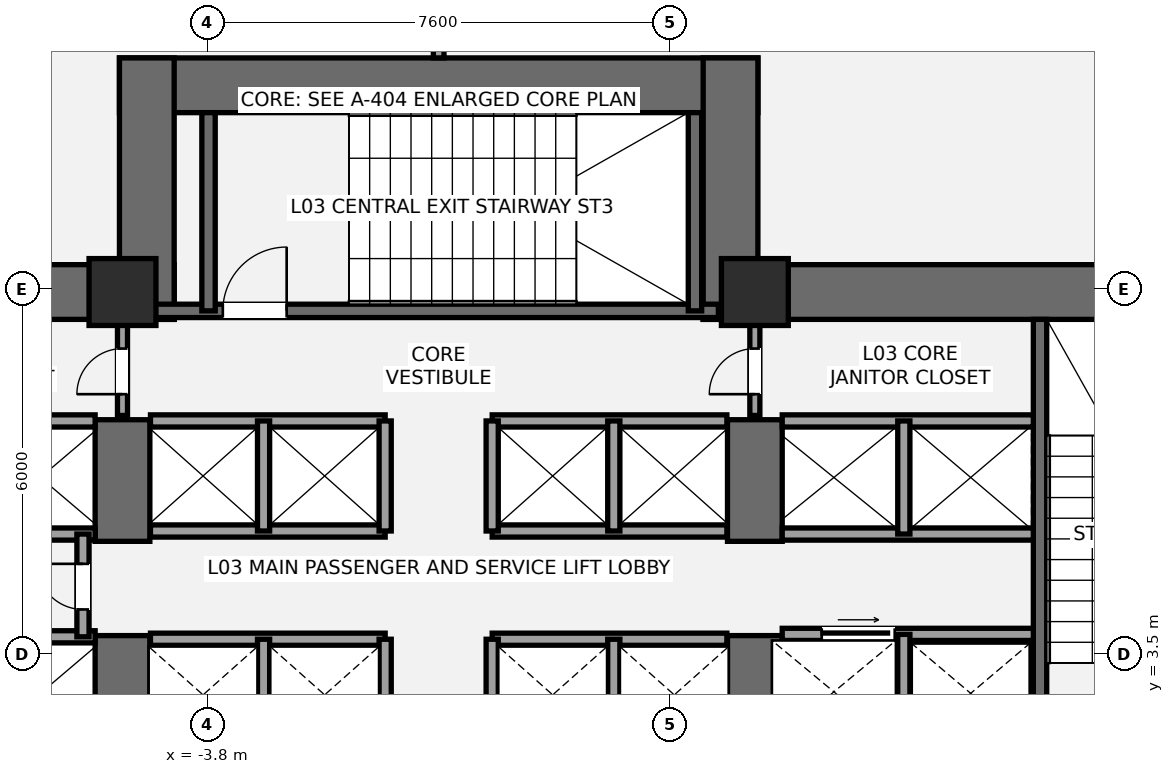
"""IFC4 building model, lengths in metres.
Left out: names, types, materials, properties, quantities, classifications, styles, units other than length and angle.
Written with IfcOpenShell. Run it as: python <this file> out.ifc"""

import sys

from ifc_helpers import new_model, si_unit, direction, frame, frame_2d, origin, origin_2d, place, context, subcontext, project, spatial, rectangle, extrude, element, fill, save


model = new_model("IFC4")
c1 = context("Model", 3, precision=1e-05, world=origin(), true_north=direction((0.0, 1.0)))
c2 = subcontext(c1, "Body", "Model", "MODEL_VIEW")
j1 = project(units=[si_unit("LENGTHUNIT", "METRE"), si_unit("PLANEANGLEUNIT", "RADIAN")], contexts=[c1])
p1 = place(None, origin())
s1 = spatial("IfcSite", under=j1, at=p1, CompositionType="ELEMENT")
p2 = place(p1, origin())
s2 = spatial("IfcBuilding", under=s1, at=p2, CompositionType="ELEMENT")
p3 = place(p2, frame((0.0, 0.0, 14.4)))
s3 = spatial("IfcBuildingStorey", under=s2, at=p3, CompositionType="ELEMENT", Elevation=14.4)
p4 = place(p3, frame((-14.05, 9.45, 0.0), z_axis=(0.0, 0.0, 1.0), x_axis=(1.0, 0.0, 0.0)))
e1 = element("IfcWall", 1, at=p4, inside=s3, PredefinedType="SHEAR", context=c2, shape_type="SweptSolid", body=[
    extrude(rectangle(XDim=9.7, YDim=0.9, at=frame_2d((4.85, 0.0))), origin(), (0.0, 0.0, 1.0), 4.2),
])
p5 = place(p3, frame((-5.2, 0.95, 0.0), z_axis=(0.0, 0.0, 1.0), x_axis=(0.0, 1.0, 0.0)))
e2 = element("IfcWall", 2, at=p5, inside=s3, PredefinedType="SHEAR", context=c2, shape_type="SweptSolid", body=[
    extrude(rectangle(XDim=2.85, YDim=0.9, at=frame_2d((1.425, 0.0))), origin(), (0.0, 0.0, 1.0), 4.2),
])
p6 = place(p3, frame((-5.2, 5.35, 0.0), z_axis=(0.0, 0.0, 1.0), x_axis=(0.0, 1.0, 0.0)))
e3 = element("IfcWall", 3, at=p6, inside=s3, PredefinedType="SHEAR", context=c2, shape_type="SweptSolid", body=[
    extrude(rectangle(XDim=2.0, YDim=0.9, at=frame_2d((1.0, 0.0))), origin(), (0.0, 0.0, 1.0), 4.2),
])
p7 = place(p3, frame((4.35, 9.45, 0.0), z_axis=(0.0, 0.0, 1.0), x_axis=(1.0, 0.0, 0.0)))
e4 = element("IfcWall", 4, at=p7, inside=s3, PredefinedType="SHEAR", context=c2, shape_type="SweptSolid", body=[
    extrude(rectangle(XDim=9.7, YDim=0.9, at=frame_2d((4.85, 0.0))), origin(), (0.0, 0.0, 1.0), 4.2),
])
p8 = place(p3, frame((5.2, 0.95, 0.0), z_axis=(0.0, 0.0, 1.0), x_axis=(0.0, 1.0, 0.0)))
e5 = element("IfcWall", 5, at=p8, inside=s3, PredefinedType="SHEAR", context=c2, shape_type="SweptSolid", body=[
    extrude(rectangle(XDim=2.85, YDim=0.9, at=frame_2d((1.425, 0.0))), origin(), (0.0, 0.0, 1.0), 4.2),
])
p9 = place(p3, frame((5.2, 5.35, 0.0), z_axis=(0.0, 0.0, 1.0), x_axis=(0.0, 1.0, 0.0)))
e6 = element("IfcWall", 6, at=p9, inside=s3, PredefinedType="SHEAR", context=c2, shape_type="SweptSolid", body=[
    extrude(rectangle(XDim=2.0, YDim=0.9, at=frame_2d((1.0, 0.0))), origin(), (0.0, 0.0, 1.0), 4.2),
])
p10 = place(p3, frame((9.89, 1.85, 0.0), z_axis=(0.0, 0.0, 1.0), x_axis=(0.0, 1.0, 0.0)))
e7 = element("IfcWall", 7, at=p10, inside=s3, PredefinedType="SHEAR", context=c2, shape_type="SweptSolid", body=[
    extrude(rectangle(XDim=7.15, YDim=0.22, at=frame_2d((3.575, 0.0))), origin(), (0.0, 0.0, 1.0), 4.2),
])
p11 = place(p3, frame((-5.25, 12.85, 0.0), z_axis=(0.0, 0.0, 1.0), x_axis=(1.0, 0.0, 0.0)))
e8 = element("IfcWall", 8, at=p11, inside=s3, PredefinedType="SHEAR", context=c2, shape_type="SweptSolid", body=[
    extrude(rectangle(XDim=10.5, YDim=0.9, at=frame_2d((5.25, 0.0))), origin(), (0.0, 0.0, 1.0), 4.2),
])
for number, where, z_axis, x_axis in (
    (9, (-4.8, 9.0, 0.0), (0.0, 0.0, 1.0), (0.0, 1.0, 0.0)),
    (10, (4.8, 9.0, 0.0), (0.0, 0.0, 1.0), (0.0, 1.0, 0.0)),
):
    element("IfcWall", number, at=place(p3, frame(where, z_axis=z_axis, x_axis=x_axis)), inside=s3, PredefinedType="SHEAR", context=c2, shape_type="SweptSolid", body=[
        extrude(rectangle(XDim=4.3, YDim=0.9, at=frame_2d((2.15, 0.0))), origin(), (0.0, 0.0, 1.0), 4.2),
    ])
p12 = place(p3, frame((-4.7, 9.14, 0.0), z_axis=(0.0, 0.0, 1.0), x_axis=(1.0, 0.0, 0.0)))
e11 = element("IfcWall", 11, at=p12, inside=s3, PredefinedType="SHEAR", context=c2, shape_type="SweptSolid", body=[
    extrude(rectangle(XDim=9.3, YDim=0.22, at=frame_2d((4.65, 0.0))), origin(), (0.0, 0.0, 1.0), 4.2),
])
p13 = place(p12, frame((1.15, 0.0, 0.0)))
e12 = element("IfcOpeningElement", 12, at=p13, cuts=e11, PredefinedType="OPENING", context=c2, shape_type="SweptSolid", body=[
    extrude(rectangle(XDim=1.05, YDim=2.15, at=frame_2d((0.525, 1.075))), frame((0.0, 0.12, 0.0), z_axis=(0.0, -1.0, 0.0), x_axis=(1.0, 0.0, 0.0)), (0.0, 0.0, 1.0), 0.24),
])
for number, where, z_axis, x_axis in (
    (13, (-3.785, 9.14, 0.0), (0.0, 0.0, 1.0), (0.0, 1.0, 0.0)),
    (14, (4.215, 9.14, 0.0), (0.0, 0.0, 1.0), (0.0, 1.0, 0.0)),
):
    element("IfcWall", number, at=place(p3, frame(where, z_axis=z_axis, x_axis=x_axis)), inside=s3, PredefinedType="SHEAR", context=c2, shape_type="SweptSolid", body=[
        extrude(rectangle(XDim=3.26, YDim=0.22, at=frame_2d((1.63, 0.0))), origin(), (0.0, 0.0, 1.0), 4.2),
    ])
for number, where, z_axis, x_axis in (
    (15, (-5.2, 9.45, 0.0), (0.0, 0.0, 1.0), (1.0, 0.0, 0.0)),
    (16, (5.2, 9.45, 0.0), (0.0, 0.0, 1.0), (1.0, 0.0, 0.0)),
):
    element("IfcColumn", number, at=place(p3, frame(where, z_axis=z_axis, x_axis=x_axis)), inside=s3, PredefinedType="COLUMN", context=c2, shape_type="SweptSolid", body=[
        extrude(rectangle(XDim=1.1, YDim=1.1, at=origin_2d()), origin(), (0.0, 0.0, 1.0), 4.2),
    ])
for number, where, z_axis, x_axis in (
    (17, (-9.78, 3.78, 0.0), (0.0, 0.0, 1.0), (1.0, 0.0, 0.0)),
    (18, (-9.78, 5.47, 0.0), (0.0, 0.0, 1.0), (1.0, 0.0, 0.0)),
    (19, (-9.78, 7.33, 0.0), (0.0, 0.0, 1.0), (1.0, 0.0, 0.0)),
):
    element("IfcWall", number, at=place(p3, frame(where, z_axis=z_axis, x_axis=x_axis)), inside=s3, PredefinedType="SOLIDWALL", context=c2, shape_type="SweptSolid", body=[
        extrude(rectangle(XDim=4.13, YDim=0.2, at=frame_2d((2.065, 0.0))), origin(), (0.0, 0.0, 1.0), 3.98),
    ])
p14 = place(p3, frame((-5.85, 3.78, 0.0), z_axis=(0.0, 0.0, 1.0), x_axis=(0.0, 1.0, 0.0)))
e20 = element("IfcWall", 20, at=p14, inside=s3, PredefinedType="SOLIDWALL", context=c2, shape_type="SweptSolid", body=[
    extrude(rectangle(XDim=1.69, YDim=0.2, at=frame_2d((0.845, 0.0))), origin(), (0.0, 0.0, 1.0), 3.98),
])
p15 = place(p14, frame((0.45, 0.0, 0.0)))
e21 = element("IfcOpeningElement", 21, at=p15, cuts=e20, PredefinedType="OPENING", context=c2, shape_type="SweptSolid", body=[
    extrude(rectangle(XDim=0.75, YDim=2.1, at=frame_2d((0.375, 1.05))), frame((0.0, 0.11, 0.0), z_axis=(0.0, -1.0, 0.0), x_axis=(1.0, 0.0, 0.0)), (0.0, 0.0, 1.0), 0.22),
])
p16 = place(p3, frame((5.65, 3.82, 0.0), z_axis=(0.0, 0.0, 1.0), x_axis=(1.0, 0.0, 0.0)))
e22 = element("IfcWall", 22, at=p16, inside=s3, PredefinedType="SOLIDWALL", context=c2, shape_type="SweptSolid", body=[
    extrude(rectangle(XDim=4.13, YDim=0.2, at=frame_2d((2.065, 0.0))), origin(), (0.0, 0.0, 1.0), 3.98),
])
p17 = place(p16, frame((0.65, 0.0, 0.0)))
e23 = element("IfcOpeningElement", 23, at=p17, cuts=e22, PredefinedType="OPENING", context=c2, shape_type="SweptSolid", body=[
    extrude(rectangle(XDim=1.2, YDim=2.2, at=frame_2d((0.6, 1.1))), frame((0.0, 0.11, 0.0), z_axis=(0.0, -1.0, 0.0), x_axis=(1.0, 0.0, 0.0)), (0.0, 0.0, 1.0), 0.22),
])
p18 = place(p3, frame((7.65, 1.85, 0.0), z_axis=(0.0, 0.0, 1.0), x_axis=(0.0, 1.0, 0.0)))
e24 = element("IfcWall", 24, at=p18, inside=s3, PredefinedType="SOLIDWALL", context=c2, shape_type="SweptSolid", body=[
    extrude(rectangle(XDim=1.97, YDim=0.2, at=frame_2d((0.985, 0.0))), origin(), (0.0, 0.0, 1.0), 3.98),
])
for number, where, z_axis, x_axis in (
    (25, (5.65, 5.47, 0.0), (0.0, 0.0, 1.0), (1.0, 0.0, 0.0)),
    (26, (5.65, 7.33, 0.0), (0.0, 0.0, 1.0), (1.0, 0.0, 0.0)),
):
    element("IfcWall", number, at=place(p3, frame(where, z_axis=z_axis, x_axis=x_axis)), inside=s3, PredefinedType="SOLIDWALL", context=c2, shape_type="SweptSolid", body=[
        extrude(rectangle(XDim=4.13, YDim=0.2, at=frame_2d((2.065, 0.0))), origin(), (0.0, 0.0, 1.0), 3.98),
    ])
p19 = place(p3, frame((7.65, 5.47, 0.0), z_axis=(0.0, 0.0, 1.0), x_axis=(0.0, 1.0, 0.0)))
e27 = element("IfcWall", 27, at=p19, inside=s3, PredefinedType="SOLIDWALL", context=c2, shape_type="SweptSolid", body=[
    extrude(rectangle(XDim=1.86, YDim=0.2, at=frame_2d((0.93, 0.0))), origin(), (0.0, 0.0, 1.0), 3.98),
])
for number, where, z_axis, x_axis in (
    (28, (-4.74, 3.74, 0.0), (0.0, 0.0, 1.0), (1.0, 0.0, 0.0)),
    (29, (0.88, 3.74, 0.0), (0.0, 0.0, 1.0), (1.0, 0.0, 0.0)),
):
    element("IfcWall", number, at=place(p3, frame(where, z_axis=z_axis, x_axis=x_axis)), inside=s3, PredefinedType="SOLIDWALL", context=c2, shape_type="SweptSolid", body=[
        extrude(rectangle(XDim=3.86, YDim=0.2, at=frame_2d((1.93, 0.0))), origin(), (0.0, 0.0, 1.0), 3.98),
    ])
for number, where, z_axis, x_axis in (
    (30, (-2.88, 1.92, 0.0), (0.0, 0.0, 1.0), (0.0, 1.0, 0.0)),
    (31, (2.88, 1.92, 0.0), (0.0, 0.0, 1.0), (0.0, 1.0, 0.0)),
    (32, (-0.88, 1.92, 0.0), (0.0, 0.0, 1.0), (0.0, 1.0, 0.0)),
    (33, (0.88, 1.92, 0.0), (0.0, 0.0, 1.0), (0.0, 1.0, 0.0)),
):
    element("IfcWall", number, at=place(p3, frame(where, z_axis=z_axis, x_axis=x_axis)), inside=s3, PredefinedType="SOLIDWALL", context=c2, shape_type="SweptSolid", body=[
        extrude(rectangle(XDim=1.82, YDim=0.2, at=frame_2d((0.91, 0.0))), origin(), (0.0, 0.0, 1.0), 3.98),
    ])
for number, where, z_axis, x_axis in (
    (34, (-4.74, 5.52, 0.0), (0.0, 0.0, 1.0), (1.0, 0.0, 0.0)),
    (35, (0.88, 5.52, 0.0), (0.0, 0.0, 1.0), (1.0, 0.0, 0.0)),
    (36, (-4.74, 7.33, 0.0), (0.0, 0.0, 1.0), (1.0, 0.0, 0.0)),
    (37, (0.88, 7.33, 0.0), (0.0, 0.0, 1.0), (1.0, 0.0, 0.0)),
):
    element("IfcWall", number, at=place(p3, frame(where, z_axis=z_axis, x_axis=x_axis)), inside=s3, PredefinedType="SOLIDWALL", context=c2, shape_type="SweptSolid", body=[
        extrude(rectangle(XDim=3.86, YDim=0.2, at=frame_2d((1.93, 0.0))), origin(), (0.0, 0.0, 1.0), 3.98),
    ])
for number, where, z_axis, x_axis in (
    (38, (-2.88, 5.52, 0.0), (0.0, 0.0, 1.0), (0.0, 1.0, 0.0)),
    (39, (2.88, 5.52, 0.0), (0.0, 0.0, 1.0), (0.0, 1.0, 0.0)),
    (40, (-0.88, 5.52, 0.0), (0.0, 0.0, 1.0), (0.0, 1.0, 0.0)),
    (41, (0.88, 5.52, 0.0), (0.0, 0.0, 1.0), (0.0, 1.0, 0.0)),
):
    element("IfcWall", number, at=place(p3, frame(where, z_axis=z_axis, x_axis=x_axis)), inside=s3, PredefinedType="SOLIDWALL", context=c2, shape_type="SweptSolid", body=[
        extrude(rectangle(XDim=1.81, YDim=0.2, at=frame_2d((0.905, 0.0))), origin(), (0.0, 0.0, 1.0), 3.98),
    ])
p20 = place(p3, frame((-5.2, 7.42, 0.0), z_axis=(0.0, 0.0, 1.0), x_axis=(0.0, 1.0, 0.0)))
e42 = element("IfcWall", 42, at=p20, inside=s3, PredefinedType="PARTITIONING", context=c2, shape_type="SweptSolid", body=[
    extrude(rectangle(XDim=1.58, YDim=0.165, at=frame_2d((0.79, 0.0))), origin(), (0.0, 0.0, 1.0), 3.98),
])
p21 = place(p20, frame((0.35, 0.0, 0.0)))
e43 = element("IfcOpeningElement", 43, at=p21, cuts=e42, PredefinedType="OPENING", context=c2, shape_type="SweptSolid", body=[
    extrude(rectangle(XDim=0.75, YDim=2.1, at=frame_2d((0.375, 1.05))), frame((0.0, 0.093, 0.0), z_axis=(0.0, -1.0, 0.0), x_axis=(1.0, 0.0, 0.0)), (0.0, 0.0, 1.0), 0.185),
])
p22 = place(p3, frame((5.2, 7.42, 0.0), z_axis=(0.0, 0.0, 1.0), x_axis=(0.0, 1.0, 0.0)))
e44 = element("IfcWall", 44, at=p22, inside=s3, PredefinedType="PARTITIONING", context=c2, shape_type="SweptSolid", body=[
    extrude(rectangle(XDim=1.58, YDim=0.165, at=frame_2d((0.79, 0.0))), origin(), (0.0, 0.0, 1.0), 3.98),
])
p23 = place(p22, frame((0.35, 0.0, 0.0)))
e45 = element("IfcOpeningElement", 45, at=p23, cuts=e44, PredefinedType="OPENING", context=c2, shape_type="SweptSolid", body=[
    extrude(rectangle(XDim=0.75, YDim=2.1, at=frame_2d((0.375, 1.05))), frame((0.0, 0.093, 0.0), z_axis=(0.0, -1.0, 0.0), x_axis=(1.0, 0.0, 0.0)), (0.0, 0.0, 1.0), 0.185),
])
p24 = place(p3, frame((0.0, 13.3, 0.0), z_axis=(0.0, 0.0, 1.0), x_axis=(0.0, 1.0, 0.0)))
e46 = element("IfcWall", 46, at=p24, inside=s3, PredefinedType="PARTITIONING", context=c2, shape_type="SweptSolid", body=[
    extrude(rectangle(XDim=8.106, YDim=0.175, at=frame_2d((4.053, 0.0))), origin(), (0.0, 0.0, 1.0), 3.98),
])
p25 = place(p13, origin())
e47 = element("IfcDoor", 47, at=p25, inside=s3, OperationType="SINGLE_SWING_RIGHT", PredefinedType="DOOR", context=c2, shape_type="SweptSolid", body=[
    extrude(rectangle(XDim=1.05, YDim=2.15, at=frame_2d((0.525, 1.075))), frame((0.0, 0.025, 0.0), z_axis=(0.0, -1.0, 0.0), x_axis=(1.0, 0.0, 0.0)), (0.0, 0.0, 1.0), 0.05),
])
fill(e12, e47)
p26 = place(p15, origin())
e48 = element("IfcDoor", 48, at=p26, inside=s3, OperationType="SINGLE_SWING_RIGHT", PredefinedType="DOOR", context=c2, shape_type="SweptSolid", body=[
    extrude(rectangle(XDim=0.75, YDim=2.1, at=frame_2d((0.375, 1.05))), frame((0.0, 0.025, 0.0), z_axis=(0.0, -1.0, 0.0), x_axis=(1.0, 0.0, 0.0)), (0.0, 0.0, 1.0), 0.05),
])
fill(e21, e48)
p27 = place(p17, origin())
e49 = element("IfcDoor", 49, at=p27, inside=s3, OperationType="SLIDING_TO_RIGHT", PredefinedType="DOOR", context=c2, shape_type="SweptSolid", body=[
    extrude(rectangle(XDim=1.2, YDim=2.2, at=frame_2d((0.6, 1.1))), frame((0.0, 0.025, 0.0), z_axis=(0.0, -1.0, 0.0), x_axis=(1.0, 0.0, 0.0)), (0.0, 0.0, 1.0), 0.05),
])
fill(e23, e49)
p28 = place(p21, origin())
e50 = element("IfcDoor", 50, at=p28, inside=s3, OperationType="SINGLE_SWING_LEFT", PredefinedType="DOOR", context=c2, shape_type="SweptSolid", body=[
    extrude(rectangle(XDim=0.75, YDim=2.1, at=frame_2d((0.375, 1.05))), frame((0.0, 0.025, 0.0), z_axis=(0.0, -1.0, 0.0), x_axis=(1.0, 0.0, 0.0)), (0.0, 0.0, 1.0), 0.05),
])
fill(e43, e50)
p29 = place(p23, origin())
e51 = element("IfcDoor", 51, at=p29, inside=s3, OperationType="SINGLE_SWING_LEFT", PredefinedType="DOOR", context=c2, shape_type="SweptSolid", body=[
    extrude(rectangle(XDim=0.75, YDim=2.1, at=frame_2d((0.375, 1.05))), frame((0.0, 0.025, 0.0), z_axis=(0.0, -1.0, 0.0), x_axis=(1.0, 0.0, 0.0)), (0.0, 0.0, 1.0), 0.05),
])
fill(e45, e51)
save(model, sys.argv[1])
